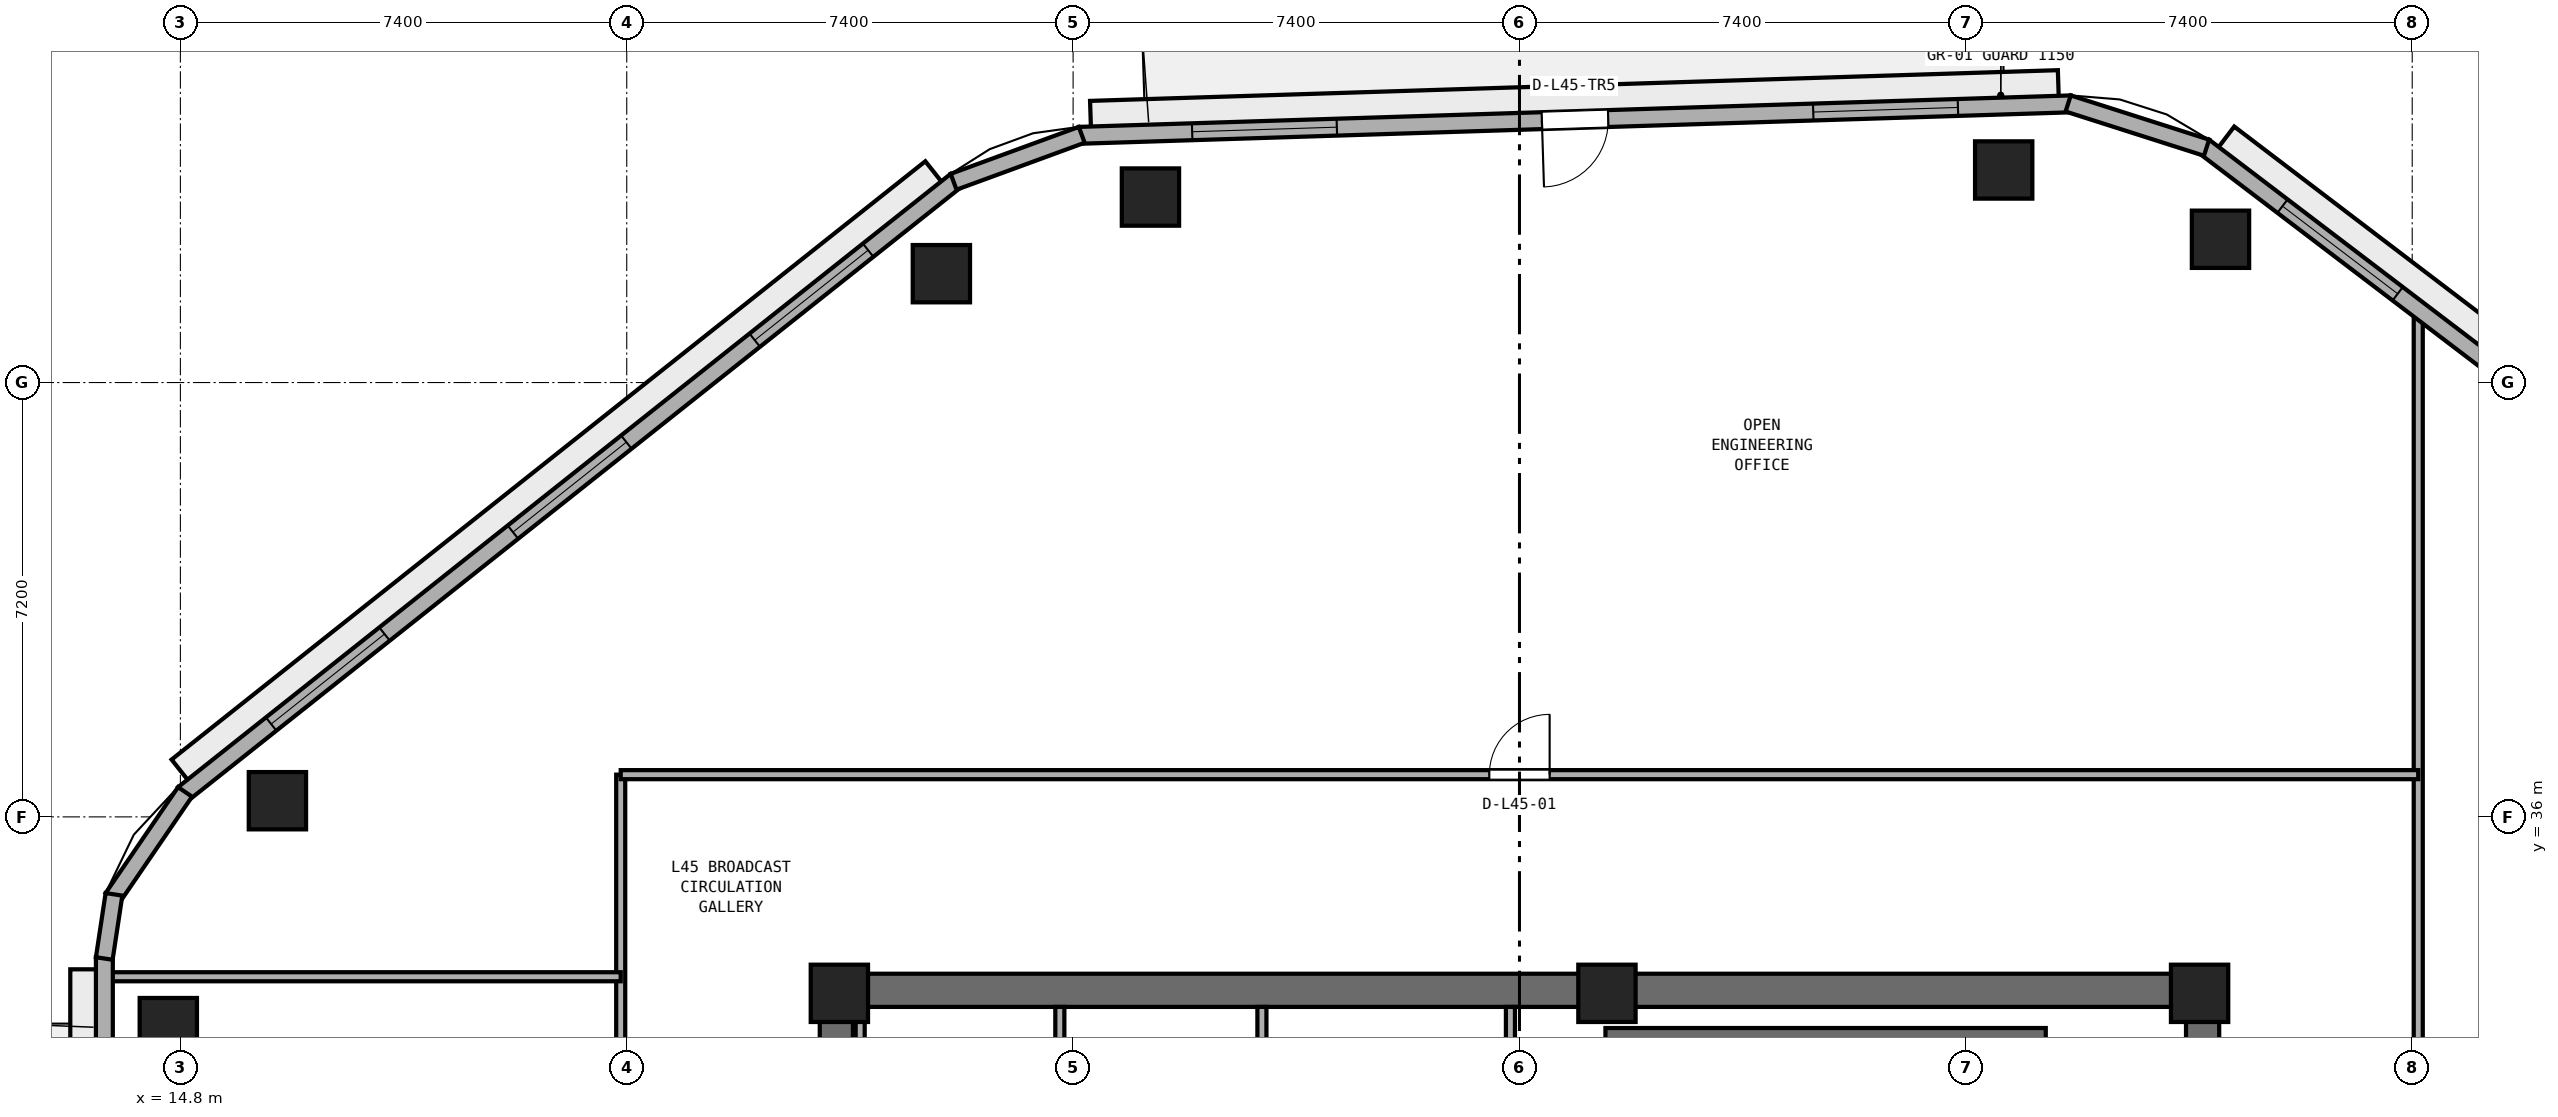
"""IFC4 building model, lengths in metres.
Left out: names, types, materials, properties, quantities, classifications, styles, units other than length and angle.
Written with IfcOpenShell. Run it as: python <this file> out.ifc"""

import sys

from ifc_helpers import new_model, si_unit, direction, frame, frame_2d, origin, origin_2d, place, context, subcontext, project, spatial, rectangle, extrude, element, fill, save


model = new_model("IFC4")
c1 = context("Model", 3, precision=1e-05, world=origin(), true_north=direction((0.0, 1.0)))
c2 = subcontext(c1, "Body", "Model", "MODEL_VIEW")
j1 = project(units=[si_unit("LENGTHUNIT", "METRE"), si_unit("PLANEANGLEUNIT", "RADIAN")], contexts=[c1])
p1 = place(None, origin())
s1 = spatial("IfcSite", under=j1, at=p1, CompositionType="ELEMENT")
p2 = place(p1, origin())
s2 = spatial("IfcBuilding", under=s1, at=p2, CompositionType="ELEMENT")
p3 = place(p2, frame((0.0, 0.0, 178.2)))
s3 = spatial("IfcBuildingStorey", under=s2, at=p3, CompositionType="ELEMENT", Elevation=178.2)
p4 = place(p3, frame((25.4, 33.125, 0.0), z_axis=(0.0, 0.0, 1.0), x_axis=(1.0, 0.0, 0.0)))
e1 = element("IfcWall", 1, at=p4, inside=s3, PredefinedType="SHEAR", context=c2, shape_type="SweptSolid", body=[
    extrude(rectangle(XDim=23.2, YDim=0.55, at=frame_2d((11.6, 0.0))), origin(), (0.0, 0.0, 1.0), 3.54),
])
p5 = place(p3, frame((25.675, 17.55, 0.0), z_axis=(0.0, 0.0, 1.0), x_axis=(0.0, 1.0, 0.0)))
e2 = element("IfcWall", 2, at=p5, inside=s3, PredefinedType="SHEAR", context=c2, shape_type="SweptSolid", body=[
    extrude(rectangle(XDim=15.3, YDim=0.55, at=frame_2d((7.65, 0.0))), origin(), (0.0, 0.0, 1.0), 3.54),
])
p6 = place(p5, frame((6.9, 0.0, 0.0)))
e3 = element("IfcOpeningElement", 3, at=p6, cuts=e2, PredefinedType="OPENING", context=c2, shape_type="SweptSolid", body=[
    extrude(rectangle(XDim=1.5, YDim=2.15, at=frame_2d((0.75, 1.075))), frame((0.0, 0.285, 0.0), z_axis=(0.0, -1.0, 0.0), x_axis=(1.0, 0.0, 0.0)), (0.0, 0.0, 1.0), 0.57),
])
p7 = place(p3, frame((48.325, 17.55, 0.0), z_axis=(0.0, 0.0, 1.0), x_axis=(0.0, 1.0, 0.0)))
e4 = element("IfcWall", 4, at=p7, inside=s3, PredefinedType="SHEAR", context=c2, shape_type="SweptSolid", body=[
    extrude(rectangle(XDim=15.3, YDim=0.55, at=frame_2d((7.65, 0.0))), origin(), (0.0, 0.0, 1.0), 3.54),
])
p8 = place(p7, frame((5.75, 0.0, 0.0)))
e5 = element("IfcOpeningElement", 5, at=p8, cuts=e4, PredefinedType="OPENING", context=c2, shape_type="SweptSolid", body=[
    extrude(rectangle(XDim=1.5, YDim=2.15, at=frame_2d((0.75, 1.075))), frame((0.0, 0.285, 0.0), z_axis=(0.0, -1.0, 0.0), x_axis=(1.0, 0.0, 0.0)), (0.0, 0.0, 1.0), 0.57),
])
for number, where, z_axis, x_axis in (
    (6, (48.275, 33.075, 0.0), (0.0, 0.0, 1.0), (1.0, 0.0, 0.0)),
    (7, (38.45, 33.075, 0.0), (0.0, 0.0, 1.0), (1.0, 0.0, 0.0)),
    (8, (25.725, 33.075, 0.0), (0.0, 0.0, 1.0), (1.0, 0.0, 0.0)),
):
    element("IfcColumn", number, at=place(p3, frame(where, z_axis=z_axis, x_axis=x_axis)), inside=s3, PredefinedType="PILASTER", context=c2, shape_type="SweptSolid", body=[
        extrude(rectangle(XDim=0.95, YDim=0.95, at=origin_2d()), origin(), (0.0, 0.0, 1.0), 3.8),
    ])
for number, where, z_axis, x_axis in (
    (9, (48.622, 45.575, 0.0), (0.0, 0.0, 1.0), (1.0, 0.0, 0.0)),
    (10, (45.028, 46.724, 0.0), (0.0, 0.0, 1.0), (1.0, 0.0, 0.0)),
    (11, (30.882, 46.275, 0.0), (0.0, 0.0, 1.0), (1.0, 0.0, 0.0)),
    (12, (27.416, 45.004, 0.0), (0.0, 0.0, 1.0), (1.0, 0.0, 0.0)),
    (13, (16.409, 36.268, 0.0), (0.0, 0.0, 1.0), (1.0, 0.0, 0.0)),
    (14, (14.6, 32.523, 0.0), (0.0, 0.0, 1.0), (1.0, 0.0, 0.0)),
):
    element("IfcColumn", number, at=place(p3, frame(where, z_axis=z_axis, x_axis=x_axis)), inside=s3, PredefinedType="COLUMN", context=c2, shape_type="SweptSolid", body=[
        extrude(rectangle(XDim=0.95, YDim=0.95, at=origin_2d()), origin(), (0.0, 0.0, 1.0), 3.8),
    ])
p9 = place(p3, frame((38.425, 32.375, 0.0), z_axis=(0.0, 0.0, 1.0), x_axis=(1.0, 0.0, 0.0)))
e15 = element("IfcWall", 15, at=p9, inside=s3, PredefinedType="SHEAR", context=c2, shape_type="SweptSolid", body=[
    extrude(rectangle(XDim=7.3, YDim=0.25, at=frame_2d((3.65, 0.0))), origin(), (0.0, 0.0, 1.0), 3.54),
])
p10 = place(p3, frame((26.07, 30.65, 0.0), z_axis=(0.0, 0.0, 1.0), x_axis=(0.0, 1.0, 0.0)))
e16 = element("IfcWall", 16, at=p10, inside=s3, PredefinedType="PARTITIONING", context=c2, shape_type="SweptSolid", body=[
    extrude(rectangle(XDim=2.2, YDim=0.15, at=frame_2d((1.1, 0.0))), origin(), (0.0, 0.0, 1.0), 2.64),
])
for number, where, z_axis, x_axis in (
    (17, (29.38, 30.65, 0.0), (0.0, 0.0, 1.0), (0.0, 1.0, 0.0)),
    (18, (32.73, 30.65, 0.0), (0.0, 0.0, 1.0), (0.0, 1.0, 0.0)),
    (19, (36.85, 30.65, 0.0), (0.0, 0.0, 1.0), (0.0, 1.0, 0.0)),
):
    element("IfcWall", number, at=place(p3, frame(where, z_axis=z_axis, x_axis=x_axis)), inside=s3, PredefinedType="PARTITIONING", context=c2, shape_type="SweptSolid", body=[
        extrude(rectangle(XDim=2.2, YDim=0.15, at=frame_2d((1.1, 0.0))), origin(), (0.0, 0.0, 1.0), 3.54),
    ])
p11 = place(p3, frame((51.9, 26.55, 0.0), z_axis=(0.0, 0.0, 1.0), x_axis=(0.0, 1.0, 0.0)))
e20 = element("IfcWall", 20, at=p11, inside=s3, PredefinedType="PARTITIONING", context=c2, shape_type="SweptSolid", body=[
    extrude(rectangle(XDim=17.898, YDim=0.15, at=frame_2d((8.949, 0.0))), origin(), (0.0, 0.0, 1.0), 3.54),
])
p12 = place(p11, frame((4.745, 0.0, 0.0)))
e21 = element("IfcOpeningElement", 21, at=p12, cuts=e20, PredefinedType="OPENING", context=c2, shape_type="SweptSolid", body=[
    extrude(rectangle(XDim=0.9, YDim=2.1, at=frame_2d((0.45, 1.05))), frame((0.0, 0.085, 0.0), z_axis=(0.0, -1.0, 0.0), x_axis=(1.0, 0.0, 0.0)), (0.0, 0.0, 1.0), 0.17),
])
p13 = place(p3, frame((22.1, 26.55, 0.0), z_axis=(0.0, 0.0, 1.0), x_axis=(0.0, 1.0, 0.0)))
e22 = element("IfcWall", 22, at=p13, inside=s3, PredefinedType="PARTITIONING", context=c2, shape_type="SweptSolid", body=[
    extrude(rectangle(XDim=10.15, YDim=0.15, at=frame_2d((5.075, 0.0))), origin(), (0.0, 0.0, 1.0), 3.54),
])
p14 = place(p3, frame((13.605, 33.35, 0.0), z_axis=(0.0, 0.0, 1.0), x_axis=(1.0, 0.0, 0.0)))
e23 = element("IfcWall", 23, at=p14, inside=s3, PredefinedType="PARTITIONING", context=c2, shape_type="SweptSolid", body=[
    extrude(rectangle(XDim=8.495, YDim=0.15, at=frame_2d((4.248, 0.0))), origin(), (0.0, 0.0, 1.0), 3.54),
])
p15 = place(p3, frame((22.1, 36.7, 0.0), z_axis=(0.0, 0.0, 1.0), x_axis=(1.0, 0.0, 0.0)))
e24 = element("IfcWall", 24, at=p15, inside=s3, PredefinedType="PARTITIONING", context=c2, shape_type="SweptSolid", body=[
    extrude(rectangle(XDim=29.8, YDim=0.15, at=frame_2d((14.9, 0.0))), origin(), (0.0, 0.0, 1.0), 3.54),
])
p16 = place(p15, frame((14.4, 0.0, 0.0)))
e25 = element("IfcOpeningElement", 25, at=p16, cuts=e24, PredefinedType="OPENING", context=c2, shape_type="SweptSolid", body=[
    extrude(rectangle(XDim=1.0, YDim=2.12, at=frame_2d((0.5, 1.06))), frame((0.0, 0.085, 0.0), z_axis=(0.0, -1.0, 0.0), x_axis=(1.0, 0.0, 0.0)), (0.0, 0.0, 1.0), 0.17),
])
p17 = place(p3, frame((60.295, 38.025, 0.0), z_axis=(0.0, 0.0, 1.0), x_axis=(-0.795831760834, 0.605517801925, 0.0)))
e26 = element("IfcWall", 26, at=p17, inside=s3, PredefinedType="STANDARD", context=c2, shape_type="SweptSolid", body=[
    extrude(rectangle(XDim=15.012, YDim=0.28, at=frame_2d((7.506, 0.0))), origin(), (0.0, 0.0, 1.0), 3.54),
])
p18 = place(p17, frame((1.635, 0.0, 0.9)))
e27 = element("IfcOpeningElement", 27, at=p18, cuts=e26, PredefinedType="OPENING", context=c2, shape_type="SweptSolid", body=[
    extrude(rectangle(XDim=2.4, YDim=1.75, at=frame_2d((1.2, 0.875))), frame((0.0, 0.15, 0.0), z_axis=(0.0, -1.0, 0.0), x_axis=(1.0, 0.0, 0.0)), (0.0, 0.0, 1.0), 0.3),
])
p19 = place(p17, frame((6.306, 0.0, 0.9)))
e28 = element("IfcOpeningElement", 28, at=p19, cuts=e26, PredefinedType="OPENING", context=c2, shape_type="SweptSolid", body=[
    extrude(rectangle(XDim=2.4, YDim=1.75, at=frame_2d((1.2, 0.875))), frame((0.0, 0.15, 0.0), z_axis=(0.0, -1.0, 0.0), x_axis=(1.0, 0.0, 0.0)), (0.0, 0.0, 1.0), 0.3),
])
p20 = place(p17, frame((10.977, 0.0, 0.9)))
e29 = element("IfcOpeningElement", 29, at=p20, cuts=e26, PredefinedType="OPENING", context=c2, shape_type="SweptSolid", body=[
    extrude(rectangle(XDim=2.4, YDim=1.75, at=frame_2d((1.2, 0.875))), frame((0.0, 0.15, 0.0), z_axis=(0.0, -1.0, 0.0), x_axis=(1.0, 0.0, 0.0)), (0.0, 0.0, 1.0), 0.3),
])
p21 = place(p3, frame((46.143, 47.82, 0.0), z_axis=(0.0, 0.0, 1.0), x_axis=(-0.999497065256, -0.031711457627, 0.0)))
e30 = element("IfcWall", 30, at=p21, inside=s3, PredefinedType="STANDARD", context=c2, shape_type="SweptSolid", body=[
    extrude(rectangle(XDim=16.452, YDim=0.28, at=frame_2d((8.226, 0.0))), origin(), (0.0, 0.0, 1.0), 3.54),
])
p22 = place(p21, frame((7.676, 0.0, 0.0)))
e31 = element("IfcOpeningElement", 31, at=p22, cuts=e30, PredefinedType="OPENING", context=c2, shape_type="SweptSolid", body=[
    extrude(rectangle(XDim=1.1, YDim=2.2, at=frame_2d((0.55, 1.1))), frame((0.0, 0.15, 0.0), z_axis=(0.0, -1.0, 0.0), x_axis=(1.0, 0.0, 0.0)), (0.0, 0.0, 1.0), 0.3),
])
p23 = place(p21, frame((1.875, 0.0, 0.9)))
e32 = element("IfcOpeningElement", 32, at=p23, cuts=e30, PredefinedType="OPENING", context=c2, shape_type="SweptSolid", body=[
    extrude(rectangle(XDim=2.4, YDim=1.75, at=frame_2d((1.2, 0.875))), frame((0.0, 0.15, 0.0), z_axis=(0.0, -1.0, 0.0), x_axis=(1.0, 0.0, 0.0)), (0.0, 0.0, 1.0), 0.3),
])
p24 = place(p21, frame((12.177, 0.0, 0.9)))
e33 = element("IfcOpeningElement", 33, at=p24, cuts=e30, PredefinedType="OPENING", context=c2, shape_type="SweptSolid", body=[
    extrude(rectangle(XDim=2.4, YDim=1.75, at=frame_2d((1.2, 0.875))), frame((0.0, 0.15, 0.0), z_axis=(0.0, -1.0, 0.0), x_axis=(1.0, 0.0, 0.0)), (0.0, 0.0, 1.0), 0.3),
])
p25 = place(p3, frame((27.658, 46.55, 0.0), z_axis=(0.0, 0.0, 1.0), x_axis=(-0.783266285861, -0.621686356158, 0.0)))
e34 = element("IfcWall", 34, at=p25, inside=s3, PredefinedType="STANDARD", context=c2, shape_type="SweptSolid", body=[
    extrude(rectangle(XDim=16.353, YDim=0.28, at=frame_2d((8.177, 0.0))), origin(), (0.0, 0.0, 1.0), 3.54),
])
p26 = place(p25, frame((1.859, 0.0, 0.9)))
e35 = element("IfcOpeningElement", 35, at=p26, cuts=e34, PredefinedType="OPENING", context=c2, shape_type="SweptSolid", body=[
    extrude(rectangle(XDim=2.4, YDim=1.75, at=frame_2d((1.2, 0.875))), frame((0.0, 0.15, 0.0), z_axis=(0.0, -1.0, 0.0), x_axis=(1.0, 0.0, 0.0)), (0.0, 0.0, 1.0), 0.3),
])
p27 = place(p25, frame((6.977, 0.0, 0.9)))
e36 = element("IfcOpeningElement", 36, at=p27, cuts=e34, PredefinedType="OPENING", context=c2, shape_type="SweptSolid", body=[
    extrude(rectangle(XDim=2.4, YDim=1.75, at=frame_2d((1.2, 0.875))), frame((0.0, 0.15, 0.0), z_axis=(0.0, -1.0, 0.0), x_axis=(1.0, 0.0, 0.0)), (0.0, 0.0, 1.0), 0.3),
])
p28 = place(p25, frame((12.094, 0.0, 0.9)))
e37 = element("IfcOpeningElement", 37, at=p28, cuts=e34, PredefinedType="OPENING", context=c2, shape_type="SweptSolid", body=[
    extrude(rectangle(XDim=2.4, YDim=1.75, at=frame_2d((1.2, 0.875))), frame((0.0, 0.15, 0.0), z_axis=(0.0, -1.0, 0.0), x_axis=(1.0, 0.0, 0.0)), (0.0, 0.0, 1.0), 0.3),
])
p29 = place(p3, frame((13.54, 33.673, 0.0), z_axis=(0.0, 0.0, 1.0), x_axis=(0.0, -1.0, 0.0)))
e38 = element("IfcWall", 38, at=p29, inside=s3, PredefinedType="STANDARD", context=c2, shape_type="SweptSolid", body=[
    extrude(rectangle(XDim=17.751, YDim=0.28, at=frame_2d((8.875, 0.0))), origin(), (0.0, 0.0, 1.0), 3.54),
])
p30 = place(p29, frame((8.326, 0.0, 0.0)))
e39 = element("IfcOpeningElement", 39, at=p30, cuts=e38, PredefinedType="OPENING", context=c2, shape_type="SweptSolid", body=[
    extrude(rectangle(XDim=1.1, YDim=2.2, at=frame_2d((0.55, 1.1))), frame((0.0, 0.15, 0.0), z_axis=(0.0, -1.0, 0.0), x_axis=(1.0, 0.0, 0.0)), (0.0, 0.0, 1.0), 0.3),
])
p31 = place(p29, frame((2.092, 0.0, 0.9)))
e40 = element("IfcOpeningElement", 40, at=p31, cuts=e38, PredefinedType="OPENING", context=c2, shape_type="SweptSolid", body=[
    extrude(rectangle(XDim=2.4, YDim=1.75, at=frame_2d((1.2, 0.875))), frame((0.0, 0.15, 0.0), z_axis=(0.0, -1.0, 0.0), x_axis=(1.0, 0.0, 0.0)), (0.0, 0.0, 1.0), 0.3),
])
p32 = place(p29, frame((13.26, 0.0, 0.9)))
e41 = element("IfcOpeningElement", 41, at=p32, cuts=e38, PredefinedType="OPENING", context=c2, shape_type="SweptSolid", body=[
    extrude(rectangle(XDim=2.4, YDim=1.75, at=frame_2d((1.2, 0.875))), frame((0.0, 0.15, 0.0), z_axis=(0.0, -1.0, 0.0), x_axis=(1.0, 0.0, 0.0)), (0.0, 0.0, 1.0), 0.3),
])
p33 = place(p3, frame((48.39, 47.093, 0.0), z_axis=(0.0, 0.0, 1.0), x_axis=(-0.952542948918, 0.304404222156, 0.0)))
e42 = element("IfcWall", 42, at=p33, inside=s3, PredefinedType="STANDARD", context=c2, shape_type="SweptSolid", body=[
    extrude(rectangle(XDim=2.408, YDim=0.28, at=frame_2d((1.204, 0.0))), origin(), (0.0, 0.0, 1.0), 3.54),
])
p34 = place(p3, frame((29.743, 47.306, 0.0), z_axis=(0.0, 0.0, 1.0), x_axis=(-0.93893328381, -0.344099242302, 0.0)))
e43 = element("IfcWall", 43, at=p34, inside=s3, PredefinedType="STANDARD", context=c2, shape_type="SweptSolid", body=[
    extrude(rectangle(XDim=2.262, YDim=0.28, at=frame_2d((1.131, 0.0))), origin(), (0.0, 0.0, 1.0), 3.54),
])
p35 = place(p3, frame((14.878, 36.414, 0.0), z_axis=(0.0, 0.0, 1.0), x_axis=(-0.564564614133, -0.825388875906, 0.0)))
e44 = element("IfcWall", 44, at=p35, inside=s3, PredefinedType="STANDARD", context=c2, shape_type="SweptSolid", body=[
    extrude(rectangle(XDim=2.128, YDim=0.28, at=frame_2d((1.064, 0.0))), origin(), (0.0, 0.0, 1.0), 3.54),
])
p36 = place(p3, frame((13.699, 34.716, 0.0), z_axis=(0.0, 0.0, 1.0), x_axis=(-0.149549920187, -0.988754176412, 0.0)))
e45 = element("IfcWall", 45, at=p36, inside=s3, PredefinedType="STANDARD", context=c2, shape_type="SweptSolid", body=[
    extrude(rectangle(XDim=1.076, YDim=0.28, at=frame_2d((0.538, 0.0))), origin(), (0.0, 0.0, 1.0), 3.54),
])
p37 = place(p16, origin())
e46 = element("IfcDoor", 46, at=p37, inside=s3, OperationType="SINGLE_SWING_RIGHT", PredefinedType="DOOR", context=c2, shape_type="SweptSolid", body=[
    extrude(rectangle(XDim=1.0, YDim=2.12, at=frame_2d((0.5, 1.06))), frame((0.0, 0.025, 0.0), z_axis=(0.0, -1.0, 0.0), x_axis=(1.0, 0.0, 0.0)), (0.0, 0.0, 1.0), 0.05),
])
fill(e25, e46)
p38 = place(p20, origin())
e47 = element("IfcWindow", 47, at=p38, inside=s3, PartitioningType="SINGLE_PANEL", PredefinedType="WINDOW", context=c2, shape_type="SweptSolid", body=[
    extrude(rectangle(XDim=2.4, YDim=1.75, at=frame_2d((1.2, 0.875))), frame((0.0, 0.03, 0.0), z_axis=(0.0, -1.0, 0.0), x_axis=(1.0, 0.0, 0.0)), (0.0, 0.0, 1.0), 0.06),
])
fill(e29, e47)
p39 = place(p22, origin())
e48 = element("IfcDoor", 48, at=p39, inside=s3, OperationType="SINGLE_SWING_RIGHT", PredefinedType="DOOR", context=c2, shape_type="SweptSolid", body=[
    extrude(rectangle(XDim=1.1, YDim=2.2, at=frame_2d((0.55, 1.1))), frame((0.0, 0.025, 0.0), z_axis=(0.0, -1.0, 0.0), x_axis=(1.0, 0.0, 0.0)), (0.0, 0.0, 1.0), 0.05),
])
fill(e31, e48)
p40 = place(p23, origin())
e49 = element("IfcWindow", 49, at=p40, inside=s3, PartitioningType="SINGLE_PANEL", PredefinedType="WINDOW", context=c2, shape_type="SweptSolid", body=[
    extrude(rectangle(XDim=2.4, YDim=1.75, at=frame_2d((1.2, 0.875))), frame((0.0, 0.03, 0.0), z_axis=(0.0, -1.0, 0.0), x_axis=(1.0, 0.0, 0.0)), (0.0, 0.0, 1.0), 0.06),
])
fill(e32, e49)
p41 = place(p24, origin())
e50 = element("IfcWindow", 50, at=p41, inside=s3, PartitioningType="SINGLE_PANEL", PredefinedType="WINDOW", context=c2, shape_type="SweptSolid", body=[
    extrude(rectangle(XDim=2.4, YDim=1.75, at=frame_2d((1.2, 0.875))), frame((0.0, 0.03, 0.0), z_axis=(0.0, -1.0, 0.0), x_axis=(1.0, 0.0, 0.0)), (0.0, 0.0, 1.0), 0.06),
])
fill(e33, e50)
p42 = place(p26, origin())
e51 = element("IfcWindow", 51, at=p42, inside=s3, PartitioningType="SINGLE_PANEL", PredefinedType="WINDOW", context=c2, shape_type="SweptSolid", body=[
    extrude(rectangle(XDim=2.4, YDim=1.75, at=frame_2d((1.2, 0.875))), frame((0.0, 0.03, 0.0), z_axis=(0.0, -1.0, 0.0), x_axis=(1.0, 0.0, 0.0)), (0.0, 0.0, 1.0), 0.06),
])
fill(e35, e51)
p43 = place(p27, origin())
e52 = element("IfcWindow", 52, at=p43, inside=s3, PartitioningType="SINGLE_PANEL", PredefinedType="WINDOW", context=c2, shape_type="SweptSolid", body=[
    extrude(rectangle(XDim=2.4, YDim=1.75, at=frame_2d((1.2, 0.875))), frame((0.0, 0.03, 0.0), z_axis=(0.0, -1.0, 0.0), x_axis=(1.0, 0.0, 0.0)), (0.0, 0.0, 1.0), 0.06),
])
fill(e36, e52)
p44 = place(p28, origin())
e53 = element("IfcWindow", 53, at=p44, inside=s3, PartitioningType="SINGLE_PANEL", PredefinedType="WINDOW", context=c2, shape_type="SweptSolid", body=[
    extrude(rectangle(XDim=2.4, YDim=1.75, at=frame_2d((1.2, 0.875))), frame((0.0, 0.03, 0.0), z_axis=(0.0, -1.0, 0.0), x_axis=(1.0, 0.0, 0.0)), (0.0, 0.0, 1.0), 0.06),
])
fill(e37, e53)
save(model, sys.argv[1])
